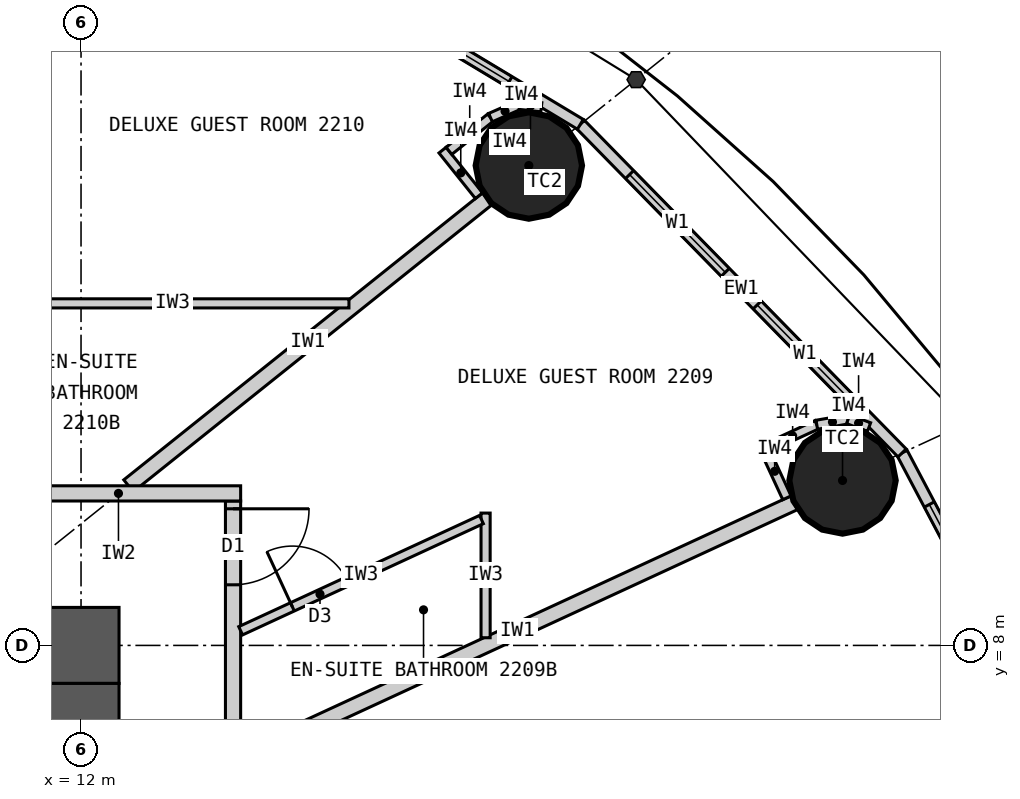
"""IFC4 building model, lengths in metres.
Left out: names, types, materials, properties, quantities, classifications, styles, units other than length and angle.
Written with IfcOpenShell. Run it as: python <this file> out.ifc"""

import sys

from ifc_helpers import new_model, si_unit, direction, frame, frame_2d, origin, origin_2d, place, context, subcontext, project, spatial, rectangle, circle, extrude, element, fill, save


model = new_model("IFC4")
c1 = context("Model", 3, precision=1e-05, world=origin(), true_north=direction((0.0, 1.0)))
c2 = subcontext(c1, "Body", "Model", "MODEL_VIEW")
j1 = project(units=[si_unit("LENGTHUNIT", "METRE"), si_unit("PLANEANGLEUNIT", "RADIAN")], contexts=[c1])
p1 = place(None, origin())
s1 = spatial("IfcSite", under=j1, at=p1, CompositionType="ELEMENT")
p2 = place(p1, origin())
s2 = spatial("IfcBuilding", under=s1, at=p2, CompositionType="ELEMENT")
p3 = place(p2, frame((0.0, 0.0, 87.0)))
s3 = spatial("IfcBuildingStorey", under=s2, at=p3, CompositionType="ELEMENT", Elevation=87.0)
for number, where, z_axis, x_axis in (
    (1, (22.019, 10.17, 0.0), (0.0, 0.0, 1.0), (1.0, 0.0, 0.0)),
    (2, (17.892, 14.313, 0.0), (0.0, 0.0, 1.0), (1.0, 0.0, 0.0)),
):
    element("IfcColumn", number, at=place(p3, frame(where, z_axis=z_axis, x_axis=x_axis)), inside=s3, PredefinedType="COLUMN", context=c2, shape_type="SweptSolid", body=[
        extrude(circle(Radius=0.7, at=origin_2d()), origin(), (0.0, 0.0, 1.0), 3.3),
    ])
p4 = place(p3, frame((-12.5, 8.0, 0.0), z_axis=(0.0, 0.0, 1.0), x_axis=(1.0, 0.0, 0.0)))
e3 = element("IfcWall", 3, at=p4, inside=s3, PredefinedType="SHEAR", context=c2, shape_type="SweptSolid", body=[
    extrude(rectangle(XDim=25.0, YDim=1.0, at=frame_2d((12.5, 0.0))), origin(), (0.0, 0.0, 1.0), 3.3),
])
p5 = place(p4, frame((11.2, 0.0, 0.0)))
e4 = element("IfcOpeningElement", 4, at=p5, cuts=e3, PredefinedType="OPENING", context=c2, shape_type="SweptSolid", body=[
    extrude(rectangle(XDim=1.2, YDim=2.2, at=frame_2d((0.6, 1.1))), frame((0.0, 0.51, 0.0), z_axis=(0.0, -1.0, 0.0), x_axis=(1.0, 0.0, 0.0)), (0.0, 0.0, 1.0), 1.02),
])
p6 = place(p4, frame((18.8, 0.0, 0.0)))
e5 = element("IfcOpeningElement", 5, at=p6, cuts=e3, PredefinedType="OPENING", context=c2, shape_type="SweptSolid", body=[
    extrude(rectangle(XDim=0.9, YDim=2.2, at=frame_2d((0.45, 1.1))), frame((0.0, 0.51, 0.0), z_axis=(0.0, -1.0, 0.0), x_axis=(1.0, 0.0, 0.0)), (0.0, 0.0, 1.0), 1.02),
])
p7 = place(p3, frame((12.0, -7.5, 0.0), z_axis=(0.0, 0.0, 1.0), x_axis=(0.0, 1.0, 0.0)))
e6 = element("IfcWall", 6, at=p7, inside=s3, PredefinedType="SHEAR", context=c2, shape_type="SweptSolid", body=[
    extrude(rectangle(XDim=15.0, YDim=1.0, at=frame_2d((7.5, 0.0))), origin(), (0.0, 0.0, 1.0), 3.3),
])
p8 = place(p7, frame((6.6, 0.0, 0.0)))
e7 = element("IfcOpeningElement", 7, at=p8, cuts=e6, PredefinedType="OPENING", context=c2, shape_type="SweptSolid", body=[
    extrude(rectangle(XDim=1.8, YDim=2.2, at=frame_2d((0.9, 1.1))), frame((0.0, 0.51, 0.0), z_axis=(0.0, -1.0, 0.0), x_axis=(1.0, 0.0, 0.0)), (0.0, 0.0, 1.0), 1.02),
])
p9 = place(p3, frame((25.482, 5.462, 0.0), z_axis=(0.0, 0.0, 1.0), x_axis=(-0.467296867008, 0.884100468321, 0.0)))
e8 = element("IfcWall", 8, at=p9, inside=s3, PredefinedType="ELEMENTEDWALL", context=c2, shape_type="SweptSolid", body=[
    extrude(rectangle(XDim=5.734, YDim=0.15, at=frame_2d((2.867, 0.0))), origin(), (0.0, 0.0, 1.0), 3.12),
])
p10 = place(p9, frame((0.767, 0.0, 0.9)))
e9 = element("IfcOpeningElement", 9, at=p10, cuts=e8, PredefinedType="OPENING", context=c2, shape_type="SweptSolid", body=[
    extrude(rectangle(XDim=1.8, YDim=1.9, at=frame_2d((0.9, 0.95))), frame((0.0, 0.085, 0.0), z_axis=(0.0, -1.0, 0.0), x_axis=(1.0, 0.0, 0.0)), (0.0, 0.0, 1.0), 0.17),
])
p11 = place(p9, frame((3.167, 0.0, 0.9)))
e10 = element("IfcOpeningElement", 10, at=p11, cuts=e8, PredefinedType="OPENING", context=c2, shape_type="SweptSolid", body=[
    extrude(rectangle(XDim=1.8, YDim=1.9, at=frame_2d((0.9, 0.95))), frame((0.0, 0.085, 0.0), z_axis=(0.0, -1.0, 0.0), x_axis=(1.0, 0.0, 0.0)), (0.0, 0.0, 1.0), 0.17),
])
p12 = place(p3, frame((22.803, 10.532, 0.0), z_axis=(0.0, 0.0, 1.0), x_axis=(-0.699602905915, 0.714531856557, 0.0)))
e11 = element("IfcWall", 11, at=p12, inside=s3, PredefinedType="ELEMENTEDWALL", context=c2, shape_type="SweptSolid", body=[
    extrude(rectangle(XDim=6.051, YDim=0.15, at=frame_2d((3.025, 0.0))), origin(), (0.0, 0.0, 1.0), 3.12),
])
p13 = place(p12, frame((0.926, 0.0, 0.9)))
e12 = element("IfcOpeningElement", 12, at=p13, cuts=e11, PredefinedType="OPENING", context=c2, shape_type="SweptSolid", body=[
    extrude(rectangle(XDim=1.8, YDim=1.9, at=frame_2d((0.9, 0.95))), frame((0.0, 0.085, 0.0), z_axis=(0.0, -1.0, 0.0), x_axis=(1.0, 0.0, 0.0)), (0.0, 0.0, 1.0), 0.17),
])
p14 = place(p12, frame((3.325, 0.0, 0.9)))
e13 = element("IfcOpeningElement", 13, at=p14, cuts=e11, PredefinedType="OPENING", context=c2, shape_type="SweptSolid", body=[
    extrude(rectangle(XDim=1.8, YDim=1.9, at=frame_2d((0.9, 0.95))), frame((0.0, 0.085, 0.0), z_axis=(0.0, -1.0, 0.0), x_axis=(1.0, 0.0, 0.0)), (0.0, 0.0, 1.0), 0.17),
])
p15 = place(p3, frame((18.57, 14.856, 0.0), z_axis=(0.0, 0.0, 1.0), x_axis=(-0.856983180864, 0.515344377787, 0.0)))
e14 = element("IfcWall", 14, at=p15, inside=s3, PredefinedType="ELEMENTEDWALL", context=c2, shape_type="SweptSolid", body=[
    extrude(rectangle(XDim=6.386, YDim=0.15, at=frame_2d((3.193, 0.0))), origin(), (0.0, 0.0, 1.0), 3.12),
])
p16 = place(p15, frame((1.093, 0.0, 0.9)))
e15 = element("IfcOpeningElement", 15, at=p16, cuts=e14, PredefinedType="OPENING", context=c2, shape_type="SweptSolid", body=[
    extrude(rectangle(XDim=1.8, YDim=1.9, at=frame_2d((0.9, 0.95))), frame((0.0, 0.085, 0.0), z_axis=(0.0, -1.0, 0.0), x_axis=(1.0, 0.0, 0.0)), (0.0, 0.0, 1.0), 0.17),
])
p17 = place(p15, frame((3.493, 0.0, 0.9)))
e16 = element("IfcOpeningElement", 16, at=p17, cuts=e14, PredefinedType="OPENING", context=c2, shape_type="SweptSolid", body=[
    extrude(rectangle(XDim=1.8, YDim=1.9, at=frame_2d((0.9, 0.95))), frame((0.0, 0.085, 0.0), z_axis=(0.0, -1.0, 0.0), x_axis=(1.0, 0.0, 0.0)), (0.0, 0.0, 1.0), 0.17),
])
p18 = place(p3, frame((14.0, -9.9, 0.0), z_axis=(0.0, 0.0, 1.0), x_axis=(0.0, 1.0, 0.0)))
e17 = element("IfcWall", 17, at=p18, inside=s3, PredefinedType="PARTITIONING", context=c2, shape_type="SweptSolid", body=[
    extrude(rectangle(XDim=19.8, YDim=0.2, at=frame_2d((9.9, 0.0))), origin(), (0.0, 0.0, 1.0), 3.12),
])
p19 = place(p18, frame((0.204, 0.0, 0.0)))
e18 = element("IfcOpeningElement", 18, at=p19, cuts=e17, PredefinedType="OPENING", context=c2, shape_type="SweptSolid", body=[
    extrude(rectangle(XDim=1.0, YDim=2.2, at=frame_2d((0.5, 1.1))), frame((0.0, 0.11, 0.0), z_axis=(0.0, -1.0, 0.0), x_axis=(1.0, 0.0, 0.0)), (0.0, 0.0, 1.0), 0.22),
])
p20 = place(p18, frame((13.715, 0.0, 0.0)))
e19 = element("IfcOpeningElement", 19, at=p20, cuts=e17, PredefinedType="OPENING", context=c2, shape_type="SweptSolid", body=[
    extrude(rectangle(XDim=1.0, YDim=2.2, at=frame_2d((0.5, 1.1))), frame((0.0, 0.11, 0.0), z_axis=(0.0, -1.0, 0.0), x_axis=(1.0, 0.0, 0.0)), (0.0, 0.0, 1.0), 0.22),
])
p21 = place(p18, frame((18.698, 0.0, 0.0)))
e20 = element("IfcOpeningElement", 20, at=p21, cuts=e17, PredefinedType="OPENING", context=c2, shape_type="SweptSolid", body=[
    extrude(rectangle(XDim=1.0, YDim=2.2, at=frame_2d((0.5, 1.1))), frame((0.0, 0.11, 0.0), z_axis=(0.0, -1.0, 0.0), x_axis=(1.0, 0.0, 0.0)), (0.0, 0.0, 1.0), 0.22),
])
p22 = place(p3, frame((14.1, 6.512, 0.0), z_axis=(0.0, 0.0, 1.0), x_axis=(0.907832871056, 0.419332181247, 0.0)))
e21 = element("IfcWall", 21, at=p22, inside=s3, PredefinedType="PARTITIONING", context=c2, shape_type="SweptSolid", body=[
    extrude(rectangle(XDim=8.023, YDim=0.2, at=frame_2d((4.011, 0.0))), origin(), (0.0, 0.0, 1.0), 2.22),
])
p23 = place(p3, frame((12.625, 10.1, 0.0), z_axis=(0.0, 0.0, 1.0), x_axis=(0.780892451574, 0.624665493744, 0.0)))
e22 = element("IfcWall", 22, at=p23, inside=s3, PredefinedType="PARTITIONING", context=c2, shape_type="SweptSolid", body=[
    extrude(rectangle(XDim=6.045, YDim=0.2, at=frame_2d((3.022, 0.0))), origin(), (0.0, 0.0, 1.0), 2.27),
])
p24 = place(p3, frame((7.289, 10.1, 0.0), z_axis=(0.0, 0.0, 1.0), x_axis=(0.585198353053, 0.810890182197, 0.0)))
e23 = element("IfcWall", 23, at=p24, inside=s3, PredefinedType="PARTITIONING", context=c2, shape_type="SweptSolid", body=[
    extrude(rectangle(XDim=8.36, YDim=0.2, at=frame_2d((4.18, 0.0))), origin(), (0.0, 0.0, 1.0), 2.27),
])
p25 = place(p3, frame((17.323, 8.101, 0.0), z_axis=(0.0, 0.0, 1.0), x_axis=(0.0, 1.0, 0.0)))
e24 = element("IfcWall", 24, at=p25, inside=s3, PredefinedType="PARTITIONING", context=c2, shape_type="SweptSolid", body=[
    extrude(rectangle(XDim=1.64, YDim=0.12, at=frame_2d((0.82, 0.0))), origin(), (0.0, 0.0, 1.0), 3.12),
])
p26 = place(p3, frame((14.1, 8.193, 0.0), z_axis=(0.0, 0.0, 1.0), x_axis=(0.907836493557, 0.419324338628, 0.0)))
e25 = element("IfcWall", 25, at=p26, inside=s3, PredefinedType="PARTITIONING", context=c2, shape_type="SweptSolid", body=[
    extrude(rectangle(XDim=3.49, YDim=0.12, at=frame_2d((1.745, 0.0))), origin(), (0.0, 0.0, 1.0), 3.12),
])
p27 = place(p26, frame((0.75, 0.0, 0.0)))
e26 = element("IfcOpeningElement", 26, at=p27, cuts=e25, PredefinedType="OPENING", context=c2, shape_type="SweptSolid", body=[
    extrude(rectangle(XDim=0.8, YDim=2.1, at=frame_2d((0.4, 1.05))), frame((0.0, 0.07, 0.0), z_axis=(0.0, -1.0, 0.0), x_axis=(1.0, 0.0, 0.0)), (0.0, 0.0, 1.0), 0.14),
])
p28 = place(p3, frame((15.525, 12.5, 0.0), z_axis=(0.0, 0.0, 1.0), x_axis=(-1.0, 0.0, 0.0)))
e27 = element("IfcWall", 27, at=p28, inside=s3, PredefinedType="PARTITIONING", context=c2, shape_type="SweptSolid", body=[
    extrude(rectangle(XDim=4.64, YDim=0.12, at=frame_2d((2.32, 0.0))), origin(), (0.0, 0.0, 1.0), 3.12),
])
p29 = place(p3, frame((10.885, 10.0, 0.0), z_axis=(0.0, 0.0, 1.0), x_axis=(1.0, 0.0, 0.0)))
e28 = element("IfcWall", 28, at=p29, inside=s3, PredefinedType="PARTITIONING", context=c2, shape_type="SweptSolid", body=[
    extrude(rectangle(XDim=3.215, YDim=0.2, at=frame_2d((1.607, 0.0))), origin(), (0.0, 0.0, 1.0), 3.12),
])
p30 = place(p3, frame((21.287, 9.942, 0.0), z_axis=(0.0, 0.0, 1.0), x_axis=(-0.419259891039, 0.907866258744, 0.0)))
e29 = element("IfcWall", 29, at=p30, inside=s3, PredefinedType="PARTITIONING", context=c2, shape_type="SweptSolid", body=[
    extrude(rectangle(XDim=0.768, YDim=0.12, at=frame_2d((0.384, 0.0))), origin(), (0.0, 0.0, 1.0), 3.12),
])
p31 = place(p3, frame((21.045, 10.61, 0.0), z_axis=(0.0, 0.0, 1.0), x_axis=(0.907877701396, 0.419235112208, 0.0)))
e30 = element("IfcWall", 30, at=p31, inside=s3, PredefinedType="PARTITIONING", context=c2, shape_type="SweptSolid", body=[
    extrude(rectangle(XDim=0.7, YDim=0.12, at=frame_2d((0.35, 0.0))), origin(), (0.0, 0.0, 1.0), 3.12),
])
p32 = place(p3, frame((21.68, 10.903, 0.0), z_axis=(0.0, 0.0, 1.0), x_axis=(0.985446622073, 0.169985161247, 0.0)))
e31 = element("IfcWall", 31, at=p32, inside=s3, PredefinedType="PARTITIONING", context=c2, shape_type="SweptSolid", body=[
    extrude(rectangle(XDim=0.418, YDim=0.12, at=frame_2d((0.209, 0.0))), origin(), (0.0, 0.0, 1.0), 3.12),
])
p33 = place(p3, frame((22.092, 10.974, 0.0), z_axis=(0.0, 0.0, 1.0), x_axis=(0.938428160676, -0.345474437912, 0.0)))
e32 = element("IfcWall", 32, at=p33, inside=s3, PredefinedType="PARTITIONING", context=c2, shape_type="SweptSolid", body=[
    extrude(rectangle(XDim=0.294, YDim=0.12, at=frame_2d((0.147, 0.0))), origin(), (0.0, 0.0, 1.0), 3.12),
])
p34 = place(p3, frame((17.236, 13.917, 0.0), z_axis=(0.0, 0.0, 1.0), x_axis=(-0.624695047554, 0.780868809443, 0.0)))
e33 = element("IfcWall", 33, at=p34, inside=s3, PredefinedType="PARTITIONING", context=c2, shape_type="SweptSolid", body=[
    extrude(rectangle(XDim=0.768, YDim=0.12, at=frame_2d((0.384, 0.0))), origin(), (0.0, 0.0, 1.0), 3.12),
])
p35 = place(p3, frame((16.841, 14.507, 0.0), z_axis=(0.0, 0.0, 1.0), x_axis=(0.780902834923, 0.62465251333, 0.0)))
e34 = element("IfcWall", 34, at=p35, inside=s3, PredefinedType="PARTITIONING", context=c2, shape_type="SweptSolid", body=[
    extrude(rectangle(XDim=0.7, YDim=0.12, at=frame_2d((0.35, 0.0))), origin(), (0.0, 0.0, 1.0), 3.12),
])
p36 = place(p3, frame((17.387, 14.944, 0.0), z_axis=(0.0, 0.0, 1.0), x_axis=(0.916036698064, 0.401094462441, 0.0)))
e35 = element("IfcWall", 35, at=p36, inside=s3, PredefinedType="PARTITIONING", context=c2, shape_type="SweptSolid", body=[
    extrude(rectangle(XDim=0.418, YDim=0.12, at=frame_2d((0.209, 0.0))), origin(), (0.0, 0.0, 1.0), 3.12),
])
p37 = place(p3, frame((17.77, 15.112, 0.0), z_axis=(0.0, 0.0, 1.0), x_axis=(0.993904401174, -0.110245368731, 0.0)))
e36 = element("IfcWall", 36, at=p37, inside=s3, PredefinedType="PARTITIONING", context=c2, shape_type="SweptSolid", body=[
    extrude(rectangle(XDim=0.288, YDim=0.12, at=frame_2d((0.144, 0.0))), origin(), (0.0, 0.0, 1.0), 3.12),
])
p38 = place(p11, origin())
e37 = element("IfcWindow", 37, at=p38, inside=s3, PartitioningType="SINGLE_PANEL", PredefinedType="WINDOW", context=c2, shape_type="SweptSolid", body=[
    extrude(rectangle(XDim=1.8, YDim=1.9, at=frame_2d((0.9, 0.95))), frame((0.0, 0.03, 0.0), z_axis=(0.0, -1.0, 0.0), x_axis=(1.0, 0.0, 0.0)), (0.0, 0.0, 1.0), 0.06),
])
fill(e10, e37)
p39 = place(p13, origin())
e38 = element("IfcWindow", 38, at=p39, inside=s3, PartitioningType="SINGLE_PANEL", PredefinedType="WINDOW", context=c2, shape_type="SweptSolid", body=[
    extrude(rectangle(XDim=1.8, YDim=1.9, at=frame_2d((0.9, 0.95))), frame((0.0, 0.03, 0.0), z_axis=(0.0, -1.0, 0.0), x_axis=(1.0, 0.0, 0.0)), (0.0, 0.0, 1.0), 0.06),
])
fill(e12, e38)
p40 = place(p14, origin())
e39 = element("IfcWindow", 39, at=p40, inside=s3, PartitioningType="SINGLE_PANEL", PredefinedType="WINDOW", context=c2, shape_type="SweptSolid", body=[
    extrude(rectangle(XDim=1.8, YDim=1.9, at=frame_2d((0.9, 0.95))), frame((0.0, 0.03, 0.0), z_axis=(0.0, -1.0, 0.0), x_axis=(1.0, 0.0, 0.0)), (0.0, 0.0, 1.0), 0.06),
])
fill(e13, e39)
p41 = place(p16, origin())
e40 = element("IfcWindow", 40, at=p41, inside=s3, PartitioningType="SINGLE_PANEL", PredefinedType="WINDOW", context=c2, shape_type="SweptSolid", body=[
    extrude(rectangle(XDim=1.8, YDim=1.9, at=frame_2d((0.9, 0.95))), frame((0.0, 0.03, 0.0), z_axis=(0.0, -1.0, 0.0), x_axis=(1.0, 0.0, 0.0)), (0.0, 0.0, 1.0), 0.06),
])
fill(e15, e40)
p42 = place(p27, origin())
e41 = element("IfcDoor", 41, at=p42, inside=s3, OperationType="SINGLE_SWING_LEFT", PredefinedType="DOOR", context=c2, shape_type="SweptSolid", body=[
    extrude(rectangle(XDim=0.8, YDim=2.1, at=frame_2d((0.4, 1.05))), frame((0.0, 0.025, 0.0), z_axis=(0.0, -1.0, 0.0), x_axis=(1.0, 0.0, 0.0)), (0.0, 0.0, 1.0), 0.05),
])
fill(e26, e41)
p43 = place(p21, origin())
e42 = element("IfcDoor", 42, at=p43, inside=s3, OperationType="SINGLE_SWING_RIGHT", PredefinedType="DOOR", context=c2, shape_type="SweptSolid", body=[
    extrude(rectangle(XDim=1.0, YDim=2.2, at=frame_2d((0.5, 1.1))), frame((0.0, 0.025, 0.0), z_axis=(0.0, -1.0, 0.0), x_axis=(1.0, 0.0, 0.0)), (0.0, 0.0, 1.0), 0.05),
])
fill(e20, e42)
save(model, sys.argv[1])
